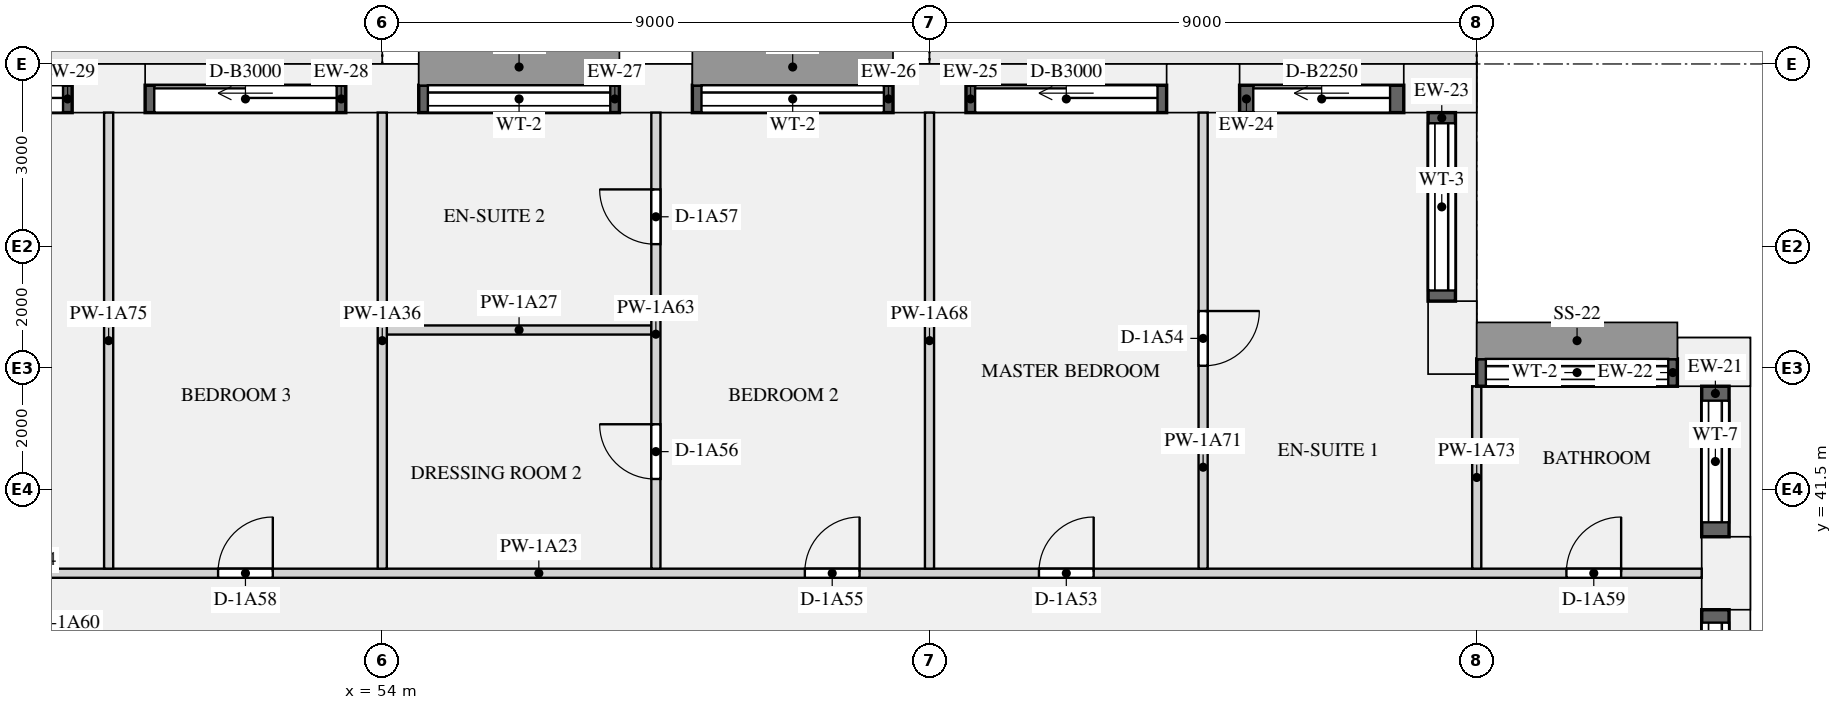
"""IFC4 building model, lengths in metres.
Left out: names, types, materials, properties, quantities, classifications, styles, units other than length and angle.
Written with IfcOpenShell. Run it as: python <this file> out.ifc"""

import sys

from ifc_helpers import new_model, si_unit, direction, frame, frame_2d, origin, origin_2d, place, context, subcontext, project, spatial, rectangle, extrude, element, fill, save


model = new_model("IFC4")
c1 = context("Model", 3, precision=1e-05, world=origin(), true_north=direction((0.0, 1.0)))
c2 = subcontext(c1, "Body", "Model", "MODEL_VIEW")
j1 = project(units=[si_unit("LENGTHUNIT", "METRE"), si_unit("PLANEANGLEUNIT", "RADIAN")], contexts=[c1])
p1 = place(None, origin())
s1 = spatial("IfcSite", under=j1, at=p1, CompositionType="ELEMENT")
p2 = place(p1, origin())
s2 = spatial("IfcBuilding", under=s1, at=p2, CompositionType="ELEMENT")
p3 = place(p2, frame((0.0, 0.0, 19.5)))
s3 = spatial("IfcBuildingStorey", under=s2, at=p3, CompositionType="ELEMENT", Elevation=19.5)
p4 = place(p3, frame((76.1, 40.125, -0.32), z_axis=(0.0, 0.0, 1.0), x_axis=(0.0, 1.0, 0.0)))
e1 = element("IfcColumn", 1, at=p4, inside=s3, PredefinedType="USERDEFINED", context=c2, shape_type="SweptSolid", body=[
    extrude(rectangle(XDim=1.2, YDim=0.8, at=origin_2d()), origin(), (0.0, 0.0, 1.0), 3.47),
])
for number, where, z_axis, x_axis in (
    (2, (75.9, 43.6, 0.0), (0.0, 0.0, 1.0), (-1.0, 0.0, 0.0)),
    (3, (71.6, 44.0, 0.0), (0.0, 0.0, 1.0), (0.0, 1.0, 0.0)),
    (4, (71.4, 48.1, 0.0), (0.0, 0.0, 1.0), (-1.0, 0.0, 0.0)),
):
    element("IfcColumn", number, at=place(p3, frame(where, z_axis=z_axis, x_axis=x_axis)), inside=s3, PredefinedType="USERDEFINED", context=c2, shape_type="SweptSolid", body=[
        extrude(rectangle(XDim=1.2, YDim=0.8, at=origin_2d()), origin(), (0.0, 0.0, 1.0), 3.15),
    ])
p5 = place(p3, frame((67.5, 48.1, -0.32), z_axis=(0.0, 0.0, 1.0), x_axis=(-1.0, 0.0, 0.0)))
e5 = element("IfcColumn", 5, at=p5, inside=s3, PredefinedType="USERDEFINED", context=c2, shape_type="SweptSolid", body=[
    extrude(rectangle(XDim=1.2, YDim=0.8, at=origin_2d()), origin(), (0.0, 0.0, 1.0), 3.47),
])
p6 = place(p3, frame((63.0, 48.1, 0.0), z_axis=(0.0, 0.0, 1.0), x_axis=(-1.0, 0.0, 0.0)))
e6 = element("IfcColumn", 6, at=p6, inside=s3, PredefinedType="USERDEFINED", context=c2, shape_type="SweptSolid", body=[
    extrude(rectangle(XDim=1.2, YDim=0.8, at=origin_2d()), origin(), (0.0, 0.0, 1.0), 3.15),
])
p7 = place(p3, frame((58.5, 48.1, -0.32), z_axis=(0.0, 0.0, 1.0), x_axis=(-1.0, 0.0, 0.0)))
e7 = element("IfcColumn", 7, at=p7, inside=s3, PredefinedType="USERDEFINED", context=c2, shape_type="SweptSolid", body=[
    extrude(rectangle(XDim=1.2, YDim=0.8, at=origin_2d()), origin(), (0.0, 0.0, 1.0), 3.47),
])
p8 = place(p3, frame((54.0, 48.1, 0.0), z_axis=(0.0, 0.0, 1.0), x_axis=(-1.0, 0.0, 0.0)))
e8 = element("IfcColumn", 8, at=p8, inside=s3, PredefinedType="USERDEFINED", context=c2, shape_type="SweptSolid", body=[
    extrude(rectangle(XDim=1.2, YDim=0.8, at=origin_2d()), origin(), (0.0, 0.0, 1.0), 3.15),
])
p9 = place(p3, frame((49.5, 48.1, -0.32), z_axis=(0.0, 0.0, 1.0), x_axis=(-1.0, 0.0, 0.0)))
e9 = element("IfcColumn", 9, at=p9, inside=s3, PredefinedType="USERDEFINED", context=c2, shape_type="SweptSolid", body=[
    extrude(rectangle(XDim=1.2, YDim=0.8, at=origin_2d()), origin(), (0.0, 0.0, 1.0), 3.47),
])
p10 = place(p3, frame((75.925, 36.85, 0.9), z_axis=(0.0, 0.0, 1.0), x_axis=(0.0, 1.0, 0.0)))
e10 = element("IfcWall", 10, at=p10, inside=s3, PredefinedType="SOLIDWALL", context=c2, shape_type="SweptSolid", body=[
    extrude(rectangle(XDim=2.675, YDim=0.45, at=frame_2d((1.337, 0.0))), origin(), (0.0, 0.0, 1.0), 1.93),
])
p11 = place(p10, frame((0.212, 0.0, 0.15)))
e11 = element("IfcOpeningElement", 11, at=p11, cuts=e10, PredefinedType="OPENING", context=c2, shape_type="SweptSolid", body=[
    extrude(rectangle(XDim=2.25, YDim=1.5, at=frame_2d((1.125, 0.75))), frame((0.0, 0.235, 0.0), z_axis=(0.0, -1.0, 0.0), x_axis=(1.0, 0.0, 0.0)), (0.0, 0.0, 1.0), 0.47),
])
p12 = place(p3, frame((75.925, 40.725, 0.9), z_axis=(0.0, 0.0, 1.0), x_axis=(0.0, 1.0, 0.0)))
e12 = element("IfcWall", 12, at=p12, inside=s3, PredefinedType="SOLIDWALL", context=c2, shape_type="SweptSolid", body=[
    extrude(rectangle(XDim=2.475, YDim=0.45, at=frame_2d((1.237, 0.0))), origin(), (0.0, 0.0, 1.0), 1.93),
])
p13 = place(p12, frame((0.238, 0.0, 0.15)))
e13 = element("IfcOpeningElement", 13, at=p13, cuts=e12, PredefinedType="OPENING", context=c2, shape_type="SweptSolid", body=[
    extrude(rectangle(XDim=2.0, YDim=1.5, at=frame_2d((1.0, 0.75))), frame((0.0, 0.235, 0.0), z_axis=(0.0, -1.0, 0.0), x_axis=(1.0, 0.0, 0.0)), (0.0, 0.0, 1.0), 0.47),
])
p14 = place(p3, frame((75.3, 43.425, 0.9), z_axis=(0.0, 0.0, 1.0), x_axis=(-1.0, 0.0, 0.0)))
e14 = element("IfcWall", 14, at=p14, inside=s3, PredefinedType="SOLIDWALL", context=c2, shape_type="SweptSolid", body=[
    extrude(rectangle(XDim=3.3, YDim=0.45, at=frame_2d((1.65, 0.0))), origin(), (0.0, 0.0, 1.0), 1.93),
])
p15 = place(p14, frame((0.15, 0.0, 0.15)))
e15 = element("IfcOpeningElement", 15, at=p15, cuts=e14, PredefinedType="OPENING", context=c2, shape_type="SweptSolid", body=[
    extrude(rectangle(XDim=3.0, YDim=1.5, at=frame_2d((1.5, 0.75))), frame((0.0, 0.235, 0.0), z_axis=(0.0, -1.0, 0.0), x_axis=(1.0, 0.0, 0.0)), (0.0, 0.0, 1.0), 0.47),
])
p16 = place(p3, frame((71.425, 44.6, 0.9), z_axis=(0.0, 0.0, 1.0), x_axis=(0.0, 1.0, 0.0)))
e16 = element("IfcWall", 16, at=p16, inside=s3, PredefinedType="SOLIDWALL", context=c2, shape_type="SweptSolid", body=[
    extrude(rectangle(XDim=3.1, YDim=0.45, at=frame_2d((1.55, 0.0))), origin(), (0.0, 0.0, 1.0), 1.93),
])
p17 = place(p16, frame((0.175, 0.0, 0.15)))
e17 = element("IfcOpeningElement", 17, at=p17, cuts=e16, PredefinedType="OPENING", context=c2, shape_type="SweptSolid", body=[
    extrude(rectangle(XDim=2.75, YDim=1.5, at=frame_2d((1.375, 0.75))), frame((0.0, 0.235, 0.0), z_axis=(0.0, -1.0, 0.0), x_axis=(1.0, 0.0, 0.0)), (0.0, 0.0, 1.0), 0.47),
])
p18 = place(p3, frame((70.8, 47.925, 0.0), z_axis=(0.0, 0.0, 1.0), x_axis=(-1.0, 0.0, 0.0)))
e18 = element("IfcWall", 18, at=p18, inside=s3, PredefinedType="SOLIDWALL", context=c2, shape_type="SweptSolid", body=[
    extrude(rectangle(XDim=2.7, YDim=0.45, at=frame_2d((1.35, 0.0))), origin(), (0.0, 0.0, 1.0), 2.83),
])
p19 = place(p18, frame((0.225, 0.0, 0.0)))
e19 = element("IfcOpeningElement", 19, at=p19, cuts=e18, PredefinedType="OPENING", context=c2, shape_type="SweptSolid", body=[
    extrude(rectangle(XDim=2.25, YDim=2.3, at=frame_2d((1.125, 1.15))), frame((0.0, 0.235, 0.0), z_axis=(0.0, -1.0, 0.0), x_axis=(1.0, 0.0, 0.0)), (0.0, 0.0, 1.0), 0.47),
])
p20 = place(p3, frame((66.9, 47.925, 0.0), z_axis=(0.0, 0.0, 1.0), x_axis=(-1.0, 0.0, 0.0)))
e20 = element("IfcWall", 20, at=p20, inside=s3, PredefinedType="SOLIDWALL", context=c2, shape_type="SweptSolid", body=[
    extrude(rectangle(XDim=3.3, YDim=0.45, at=frame_2d((1.65, 0.0))), origin(), (0.0, 0.0, 1.0), 2.83),
])
p21 = place(p20, frame((0.15, 0.0, 0.0)))
e21 = element("IfcOpeningElement", 21, at=p21, cuts=e20, PredefinedType="OPENING", context=c2, shape_type="SweptSolid", body=[
    extrude(rectangle(XDim=3.0, YDim=2.3, at=frame_2d((1.5, 1.15))), frame((0.0, 0.235, 0.0), z_axis=(0.0, -1.0, 0.0), x_axis=(1.0, 0.0, 0.0)), (0.0, 0.0, 1.0), 0.47),
])
p22 = place(p3, frame((62.4, 47.925, 0.9), z_axis=(0.0, 0.0, 1.0), x_axis=(-1.0, 0.0, 0.0)))
e22 = element("IfcWall", 22, at=p22, inside=s3, PredefinedType="SOLIDWALL", context=c2, shape_type="SweptSolid", body=[
    extrude(rectangle(XDim=3.3, YDim=0.45, at=frame_2d((1.65, 0.0))), origin(), (0.0, 0.0, 1.0), 1.93),
])
p23 = place(p22, frame((0.15, 0.0, 0.15)))
e23 = element("IfcOpeningElement", 23, at=p23, cuts=e22, PredefinedType="OPENING", context=c2, shape_type="SweptSolid", body=[
    extrude(rectangle(XDim=3.0, YDim=1.5, at=frame_2d((1.5, 0.75))), frame((0.0, 0.235, 0.0), z_axis=(0.0, -1.0, 0.0), x_axis=(1.0, 0.0, 0.0)), (0.0, 0.0, 1.0), 0.47),
])
p24 = place(p3, frame((57.9, 47.925, 0.9), z_axis=(0.0, 0.0, 1.0), x_axis=(-1.0, 0.0, 0.0)))
e24 = element("IfcWall", 24, at=p24, inside=s3, PredefinedType="SOLIDWALL", context=c2, shape_type="SweptSolid", body=[
    extrude(rectangle(XDim=3.3, YDim=0.45, at=frame_2d((1.65, 0.0))), origin(), (0.0, 0.0, 1.0), 1.93),
])
p25 = place(p24, frame((0.15, 0.0, 0.15)))
e25 = element("IfcOpeningElement", 25, at=p25, cuts=e24, PredefinedType="OPENING", context=c2, shape_type="SweptSolid", body=[
    extrude(rectangle(XDim=3.0, YDim=1.5, at=frame_2d((1.5, 0.75))), frame((0.0, 0.235, 0.0), z_axis=(0.0, -1.0, 0.0), x_axis=(1.0, 0.0, 0.0)), (0.0, 0.0, 1.0), 0.47),
])
p26 = place(p3, frame((53.4, 47.925, 0.0), z_axis=(0.0, 0.0, 1.0), x_axis=(-1.0, 0.0, 0.0)))
e26 = element("IfcWall", 26, at=p26, inside=s3, PredefinedType="SOLIDWALL", context=c2, shape_type="SweptSolid", body=[
    extrude(rectangle(XDim=3.3, YDim=0.45, at=frame_2d((1.65, 0.0))), origin(), (0.0, 0.0, 1.0), 2.83),
])
p27 = place(p26, frame((0.15, 0.0, 0.0)))
e27 = element("IfcOpeningElement", 27, at=p27, cuts=e26, PredefinedType="OPENING", context=c2, shape_type="SweptSolid", body=[
    extrude(rectangle(XDim=3.0, YDim=2.3, at=frame_2d((1.5, 1.15))), frame((0.0, 0.235, 0.0), z_axis=(0.0, -1.0, 0.0), x_axis=(1.0, 0.0, 0.0)), (0.0, 0.0, 1.0), 0.47),
])
p28 = place(p3, frame((48.9, 47.925, 0.0), z_axis=(0.0, 0.0, 1.0), x_axis=(-1.0, 0.0, 0.0)))
e28 = element("IfcWall", 28, at=p28, inside=s3, PredefinedType="SOLIDWALL", context=c2, shape_type="SweptSolid", body=[
    extrude(rectangle(XDim=3.3, YDim=0.45, at=frame_2d((1.65, 0.0))), origin(), (0.0, 0.0, 1.0), 2.83),
])
p29 = place(p28, frame((0.15, 0.0, 0.0)))
e29 = element("IfcOpeningElement", 29, at=p29, cuts=e28, PredefinedType="OPENING", context=c2, shape_type="SweptSolid", body=[
    extrude(rectangle(XDim=3.0, YDim=2.3, at=frame_2d((1.5, 1.15))), frame((0.0, 0.235, 0.0), z_axis=(0.0, -1.0, 0.0), x_axis=(1.0, 0.0, 0.0)), (0.0, 0.0, 1.0), 0.47),
])
p30 = place(p3, frame((47.925, 40.125, 0.0), z_axis=(0.0, 0.0, 1.0), x_axis=(1.0, 0.0, 0.0)))
e30 = element("IfcWall", 30, at=p30, inside=s3, PredefinedType="PARTITIONING", context=c2, shape_type="SweptSolid", body=[
    extrude(rectangle(XDim=27.775, YDim=0.15, at=frame_2d((13.887, 0.0))), origin(), (0.0, 0.0, 1.0), 2.83),
])
p31 = place(p30, frame((16.875, 0.0, 0.0)))
e31 = element("IfcOpeningElement", 31, at=p31, cuts=e30, PredefinedType="OPENING", context=c2, shape_type="SweptSolid", body=[
    extrude(rectangle(XDim=0.9, YDim=2.1, at=frame_2d((0.45, 1.05))), frame((0.0, 0.085, 0.0), z_axis=(0.0, -1.0, 0.0), x_axis=(1.0, 0.0, 0.0)), (0.0, 0.0, 1.0), 0.17),
])
p32 = place(p30, frame((13.025, 0.0, 0.0)))
e32 = element("IfcOpeningElement", 32, at=p32, cuts=e30, PredefinedType="OPENING", context=c2, shape_type="SweptSolid", body=[
    extrude(rectangle(XDim=0.9, YDim=2.1, at=frame_2d((0.45, 1.05))), frame((0.0, 0.085, 0.0), z_axis=(0.0, -1.0, 0.0), x_axis=(1.0, 0.0, 0.0)), (0.0, 0.0, 1.0), 0.17),
])
p33 = place(p30, frame((3.375, 0.0, 0.0)))
e33 = element("IfcOpeningElement", 33, at=p33, cuts=e30, PredefinedType="OPENING", context=c2, shape_type="SweptSolid", body=[
    extrude(rectangle(XDim=0.9, YDim=2.1, at=frame_2d((0.45, 1.05))), frame((0.0, 0.085, 0.0), z_axis=(0.0, -1.0, 0.0), x_axis=(1.0, 0.0, 0.0)), (0.0, 0.0, 1.0), 0.17),
])
p34 = place(p30, frame((25.55, 0.0, 0.0)))
e34 = element("IfcOpeningElement", 34, at=p34, cuts=e30, PredefinedType="OPENING", context=c2, shape_type="SweptSolid", body=[
    extrude(rectangle(XDim=0.9, YDim=2.1, at=frame_2d((0.45, 1.05))), frame((0.0, 0.085, 0.0), z_axis=(0.0, -1.0, 0.0), x_axis=(1.0, 0.0, 0.0)), (0.0, 0.0, 1.0), 0.17),
])
p35 = place(p3, frame((54.075, 44.125, 0.0), z_axis=(0.0, 0.0, 1.0), x_axis=(1.0, 0.0, 0.0)))
e35 = element("IfcWall", 35, at=p35, inside=s3, PredefinedType="PARTITIONING", context=c2, shape_type="SweptSolid", body=[
    extrude(rectangle(XDim=4.35, YDim=0.15, at=frame_2d((2.175, 0.0))), origin(), (0.0, 0.0, 1.0), 2.83),
])
p36 = place(p3, frame((54.0, 40.2, 0.0), z_axis=(0.0, 0.0, 1.0), x_axis=(0.0, 1.0, 0.0)))
e36 = element("IfcWall", 36, at=p36, inside=s3, PredefinedType="PARTITIONING", context=c2, shape_type="SweptSolid", body=[
    extrude(rectangle(XDim=7.5, YDim=0.15, at=frame_2d((3.75, 0.0))), origin(), (0.0, 0.0, 1.0), 2.83),
])
p37 = place(p3, frame((58.5, 40.2, 0.0), z_axis=(0.0, 0.0, 1.0), x_axis=(0.0, 1.0, 0.0)))
e37 = element("IfcWall", 37, at=p37, inside=s3, PredefinedType="PARTITIONING", context=c2, shape_type="SweptSolid", body=[
    extrude(rectangle(XDim=7.5, YDim=0.15, at=frame_2d((3.75, 0.0))), origin(), (0.0, 0.0, 1.0), 2.83),
])
p38 = place(p37, frame((1.475, 0.0, 0.0)))
e38 = element("IfcOpeningElement", 38, at=p38, cuts=e37, PredefinedType="OPENING", context=c2, shape_type="SweptSolid", body=[
    extrude(rectangle(XDim=0.9, YDim=2.1, at=frame_2d((0.45, 1.05))), frame((0.0, 0.085, 0.0), z_axis=(0.0, -1.0, 0.0), x_axis=(1.0, 0.0, 0.0)), (0.0, 0.0, 1.0), 0.17),
])
p39 = place(p37, frame((5.337, 0.0, 0.0)))
e39 = element("IfcOpeningElement", 39, at=p39, cuts=e37, PredefinedType="OPENING", context=c2, shape_type="SweptSolid", body=[
    extrude(rectangle(XDim=0.9, YDim=2.1, at=frame_2d((0.45, 1.05))), frame((0.0, 0.085, 0.0), z_axis=(0.0, -1.0, 0.0), x_axis=(1.0, 0.0, 0.0)), (0.0, 0.0, 1.0), 0.17),
])
p40 = place(p3, frame((63.0, 40.2, 0.0), z_axis=(0.0, 0.0, 1.0), x_axis=(0.0, 1.0, 0.0)))
e40 = element("IfcWall", 40, at=p40, inside=s3, PredefinedType="PARTITIONING", context=c2, shape_type="SweptSolid", body=[
    extrude(rectangle(XDim=7.5, YDim=0.15, at=frame_2d((3.75, 0.0))), origin(), (0.0, 0.0, 1.0), 2.83),
])
p41 = place(p3, frame((67.5, 40.2, 0.0), z_axis=(0.0, 0.0, 1.0), x_axis=(0.0, 1.0, 0.0)))
e41 = element("IfcWall", 41, at=p41, inside=s3, PredefinedType="PARTITIONING", context=c2, shape_type="SweptSolid", body=[
    extrude(rectangle(XDim=7.5, YDim=0.15, at=frame_2d((3.75, 0.0))), origin(), (0.0, 0.0, 1.0), 2.83),
])
p42 = place(p41, frame((3.337, 0.0, 0.0)))
e42 = element("IfcOpeningElement", 42, at=p42, cuts=e41, PredefinedType="OPENING", context=c2, shape_type="SweptSolid", body=[
    extrude(rectangle(XDim=0.9, YDim=2.1, at=frame_2d((0.45, 1.05))), frame((0.0, 0.085, 0.0), z_axis=(0.0, -1.0, 0.0), x_axis=(1.0, 0.0, 0.0)), (0.0, 0.0, 1.0), 0.17),
])
p43 = place(p3, frame((72.0, 40.2, 0.0), z_axis=(0.0, 0.0, 1.0), x_axis=(0.0, 1.0, 0.0)))
e43 = element("IfcWall", 43, at=p43, inside=s3, PredefinedType="PARTITIONING", context=c2, shape_type="SweptSolid", body=[
    extrude(rectangle(XDim=3.0, YDim=0.15, at=frame_2d((1.5, 0.0))), origin(), (0.0, 0.0, 1.0), 2.83),
])
p44 = place(p3, frame((49.5, 40.2, 0.0), z_axis=(0.0, 0.0, 1.0), x_axis=(0.0, 1.0, 0.0)))
e44 = element("IfcWall", 44, at=p44, inside=s3, PredefinedType="PARTITIONING", context=c2, shape_type="SweptSolid", body=[
    extrude(rectangle(XDim=7.5, YDim=0.15, at=frame_2d((3.75, 0.0))), origin(), (0.0, 0.0, 1.0), 2.83),
])
p45 = place(p11, origin())
e45 = element("IfcWindow", 45, at=p45, inside=s3, PartitioningType="SINGLE_PANEL", PredefinedType="WINDOW", context=c2, shape_type="SweptSolid", body=[
    extrude(rectangle(XDim=2.25, YDim=1.5, at=frame_2d((1.125, 0.75))), frame((0.0, -0.065, 0.0), z_axis=(0.0, -1.0, 0.0), x_axis=(1.0, 0.0, 0.0)), (0.0, 0.0, 1.0), 0.06),
])
fill(e11, e45)
p46 = place(p13, origin())
e46 = element("IfcWindow", 46, at=p46, inside=s3, PartitioningType="SINGLE_PANEL", PredefinedType="WINDOW", context=c2, shape_type="SweptSolid", body=[
    extrude(rectangle(XDim=2.0, YDim=1.5, at=frame_2d((1.0, 0.75))), frame((0.0, -0.065, 0.0), z_axis=(0.0, -1.0, 0.0), x_axis=(1.0, 0.0, 0.0)), (0.0, 0.0, 1.0), 0.06),
])
fill(e13, e46)
p47 = place(p15, origin())
e47 = element("IfcWindow", 47, at=p47, inside=s3, PartitioningType="SINGLE_PANEL", PredefinedType="WINDOW", context=c2, shape_type="SweptSolid", body=[
    extrude(rectangle(XDim=3.0, YDim=1.5, at=frame_2d((1.5, 0.75))), frame((0.0, -0.065, 0.0), z_axis=(0.0, -1.0, 0.0), x_axis=(1.0, 0.0, 0.0)), (0.0, 0.0, 1.0), 0.06),
])
fill(e15, e47)
p48 = place(p17, origin())
e48 = element("IfcWindow", 48, at=p48, inside=s3, PartitioningType="SINGLE_PANEL", PredefinedType="WINDOW", context=c2, shape_type="SweptSolid", body=[
    extrude(rectangle(XDim=2.75, YDim=1.5, at=frame_2d((1.375, 0.75))), frame((0.0, -0.065, 0.0), z_axis=(0.0, -1.0, 0.0), x_axis=(1.0, 0.0, 0.0)), (0.0, 0.0, 1.0), 0.06),
])
fill(e17, e48)
p49 = place(p19, origin())
e49 = element("IfcDoor", 49, at=p49, inside=s3, OperationType="SLIDING_TO_LEFT", PredefinedType="DOOR", context=c2, shape_type="SweptSolid", body=[
    extrude(rectangle(XDim=2.25, YDim=2.3, at=frame_2d((1.125, 1.15))), frame((0.0, -0.07, 0.0), z_axis=(0.0, -1.0, 0.0), x_axis=(1.0, 0.0, 0.0)), (0.0, 0.0, 1.0), 0.05),
])
fill(e19, e49)
p50 = place(p21, origin())
e50 = element("IfcDoor", 50, at=p50, inside=s3, OperationType="SLIDING_TO_LEFT", PredefinedType="DOOR", context=c2, shape_type="SweptSolid", body=[
    extrude(rectangle(XDim=3.0, YDim=2.3, at=frame_2d((1.5, 1.15))), frame((0.0, -0.07, 0.0), z_axis=(0.0, -1.0, 0.0), x_axis=(1.0, 0.0, 0.0)), (0.0, 0.0, 1.0), 0.05),
])
fill(e21, e50)
p51 = place(p23, origin())
e51 = element("IfcWindow", 51, at=p51, inside=s3, PartitioningType="SINGLE_PANEL", PredefinedType="WINDOW", context=c2, shape_type="SweptSolid", body=[
    extrude(rectangle(XDim=3.0, YDim=1.5, at=frame_2d((1.5, 0.75))), frame((0.0, -0.065, 0.0), z_axis=(0.0, -1.0, 0.0), x_axis=(1.0, 0.0, 0.0)), (0.0, 0.0, 1.0), 0.06),
])
fill(e23, e51)
p52 = place(p25, origin())
e52 = element("IfcWindow", 52, at=p52, inside=s3, PartitioningType="SINGLE_PANEL", PredefinedType="WINDOW", context=c2, shape_type="SweptSolid", body=[
    extrude(rectangle(XDim=3.0, YDim=1.5, at=frame_2d((1.5, 0.75))), frame((0.0, -0.065, 0.0), z_axis=(0.0, -1.0, 0.0), x_axis=(1.0, 0.0, 0.0)), (0.0, 0.0, 1.0), 0.06),
])
fill(e25, e52)
p53 = place(p27, origin())
e53 = element("IfcDoor", 53, at=p53, inside=s3, OperationType="SLIDING_TO_LEFT", PredefinedType="DOOR", context=c2, shape_type="SweptSolid", body=[
    extrude(rectangle(XDim=3.0, YDim=2.3, at=frame_2d((1.5, 1.15))), frame((0.0, -0.07, 0.0), z_axis=(0.0, -1.0, 0.0), x_axis=(1.0, 0.0, 0.0)), (0.0, 0.0, 1.0), 0.05),
])
fill(e27, e53)
p54 = place(p29, origin())
e54 = element("IfcDoor", 54, at=p54, inside=s3, OperationType="SLIDING_TO_LEFT", PredefinedType="DOOR", context=c2, shape_type="SweptSolid", body=[
    extrude(rectangle(XDim=3.0, YDim=2.3, at=frame_2d((1.5, 1.15))), frame((0.0, -0.07, 0.0), z_axis=(0.0, -1.0, 0.0), x_axis=(1.0, 0.0, 0.0)), (0.0, 0.0, 1.0), 0.05),
])
fill(e29, e54)
p55 = place(p31, origin())
e55 = element("IfcDoor", 55, at=p55, inside=s3, OperationType="SINGLE_SWING_RIGHT", PredefinedType="DOOR", context=c2, shape_type="SweptSolid", body=[
    extrude(rectangle(XDim=0.9, YDim=2.1, at=frame_2d((0.45, 1.05))), frame((0.0, 0.025, 0.0), z_axis=(0.0, -1.0, 0.0), x_axis=(1.0, 0.0, 0.0)), (0.0, 0.0, 1.0), 0.05),
])
fill(e31, e55)
p56 = place(p42, frame((0.9, 0.0, 0.0), z_axis=(0.0, 0.0, 1.0), x_axis=(-1.0, 0.0, 0.0)))
e56 = element("IfcDoor", 56, at=p56, inside=s3, OperationType="SINGLE_SWING_LEFT", PredefinedType="DOOR", context=c2, shape_type="SweptSolid", body=[
    extrude(rectangle(XDim=0.9, YDim=2.1, at=frame_2d((0.45, 1.05))), frame((0.0, 0.025, 0.0), z_axis=(0.0, -1.0, 0.0), x_axis=(1.0, 0.0, 0.0)), (0.0, 0.0, 1.0), 0.05),
])
fill(e42, e56)
p57 = place(p32, origin())
e57 = element("IfcDoor", 57, at=p57, inside=s3, OperationType="SINGLE_SWING_RIGHT", PredefinedType="DOOR", context=c2, shape_type="SweptSolid", body=[
    extrude(rectangle(XDim=0.9, YDim=2.1, at=frame_2d((0.45, 1.05))), frame((0.0, 0.025, 0.0), z_axis=(0.0, -1.0, 0.0), x_axis=(1.0, 0.0, 0.0)), (0.0, 0.0, 1.0), 0.05),
])
fill(e32, e57)
p58 = place(p38, origin())
e58 = element("IfcDoor", 58, at=p58, inside=s3, OperationType="SINGLE_SWING_RIGHT", PredefinedType="DOOR", context=c2, shape_type="SweptSolid", body=[
    extrude(rectangle(XDim=0.9, YDim=2.1, at=frame_2d((0.45, 1.05))), frame((0.0, 0.025, 0.0), z_axis=(0.0, -1.0, 0.0), x_axis=(1.0, 0.0, 0.0)), (0.0, 0.0, 1.0), 0.05),
])
fill(e38, e58)
p59 = place(p39, origin())
e59 = element("IfcDoor", 59, at=p59, inside=s3, OperationType="SINGLE_SWING_RIGHT", PredefinedType="DOOR", context=c2, shape_type="SweptSolid", body=[
    extrude(rectangle(XDim=0.9, YDim=2.1, at=frame_2d((0.45, 1.05))), frame((0.0, 0.025, 0.0), z_axis=(0.0, -1.0, 0.0), x_axis=(1.0, 0.0, 0.0)), (0.0, 0.0, 1.0), 0.05),
])
fill(e39, e59)
p60 = place(p33, origin())
e60 = element("IfcDoor", 60, at=p60, inside=s3, OperationType="SINGLE_SWING_RIGHT", PredefinedType="DOOR", context=c2, shape_type="SweptSolid", body=[
    extrude(rectangle(XDim=0.9, YDim=2.1, at=frame_2d((0.45, 1.05))), frame((0.0, 0.025, 0.0), z_axis=(0.0, -1.0, 0.0), x_axis=(1.0, 0.0, 0.0)), (0.0, 0.0, 1.0), 0.05),
])
fill(e33, e60)
p61 = place(p34, origin())
e61 = element("IfcDoor", 61, at=p61, inside=s3, OperationType="SINGLE_SWING_RIGHT", PredefinedType="DOOR", context=c2, shape_type="SweptSolid", body=[
    extrude(rectangle(XDim=0.9, YDim=2.1, at=frame_2d((0.45, 1.05))), frame((0.0, 0.025, 0.0), z_axis=(0.0, -1.0, 0.0), x_axis=(1.0, 0.0, 0.0)), (0.0, 0.0, 1.0), 0.05),
])
fill(e34, e61)
save(model, sys.argv[1])
